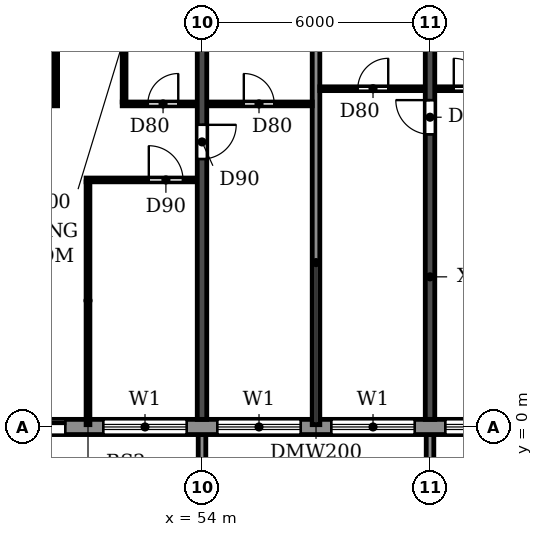
"""IFC4 building model, lengths in metres.
Left out: names, types, materials, properties, quantities, classifications, styles, units other than length and angle.
Written with IfcOpenShell. Run it as: python <this file> out.ifc"""

import sys

from ifc_helpers import new_model, si_unit, direction, frame, frame_2d, origin, place, context, subcontext, project, spatial, polyline, rectangle, outline, extrude, source, transform, mapped, element, fill, save


model = new_model("IFC4")
c1 = context("Model", 3, precision=1e-05, world=origin(), true_north=direction((0.0, 1.0)))
c2 = subcontext(c1, "Body", "Model", "MODEL_VIEW")
j1 = project(units=[si_unit("LENGTHUNIT", "METRE"), si_unit("PLANEANGLEUNIT", "RADIAN")], contexts=[c1])
p1 = place(None, origin())
s1 = spatial("IfcSite", under=j1, at=p1, CompositionType="ELEMENT")
p2 = place(p1, origin())
s2 = spatial("IfcBuilding", under=s1, at=p2, CompositionType="ELEMENT")
p3 = place(p2, frame((0.0, 0.0, 171.9)))
s3 = spatial("IfcBuildingStorey", under=s2, at=p3, CompositionType="ELEMENT", Elevation=171.9)
p4 = place(p3, frame((54.0, 0.2, 0.0), z_axis=(0.0, 0.0, 1.0), x_axis=(0.0, 1.0, 0.0)))
e1 = element("IfcWall", 1, at=p4, inside=s3, PredefinedType="SHEAR", context=c2, shape_type="SweptSolid", body=[
    extrude(rectangle(XDim=11.7, YDim=0.25, at=frame_2d((5.85, 0.0))), origin(), (0.0, 0.0, 1.0), 3.08),
])
p5 = place(p4, frame((6.85, 0.0, 0.0)))
e2 = element("IfcOpeningElement", 2, at=p5, cuts=e1, PredefinedType="OPENING", context=c2, shape_type="SweptSolid", body=[
    extrude(rectangle(XDim=0.9, YDim=2.1, at=frame_2d((0.45, 1.05))), frame((0.0, 0.135, 0.0), z_axis=(0.0, -1.0, 0.0), x_axis=(1.0, 0.0, 0.0)), (0.0, 0.0, 1.0), 0.27),
])
p6 = place(p3, frame((60.0, 0.2, 0.0), z_axis=(0.0, 0.0, 1.0), x_axis=(0.0, 1.0, 0.0)))
e3 = element("IfcWall", 3, at=p6, inside=s3, PredefinedType="SHEAR", context=c2, shape_type="SweptSolid", body=[
    extrude(rectangle(XDim=11.7, YDim=0.25, at=frame_2d((5.85, 0.0))), origin(), (0.0, 0.0, 1.0), 3.08),
])
p7 = place(p6, frame((7.5, 0.0, 0.0)))
e4 = element("IfcOpeningElement", 4, at=p7, cuts=e3, PredefinedType="OPENING", context=c2, shape_type="SweptSolid", body=[
    extrude(rectangle(XDim=0.9, YDim=2.1, at=frame_2d((0.45, 1.05))), frame((0.0, 0.135, 0.0), z_axis=(0.0, -1.0, 0.0), x_axis=(1.0, 0.0, 0.0)), (0.0, 0.0, 1.0), 0.27),
])
p8 = place(p3, frame((22.683, 0.0, 0.0), z_axis=(0.0, 0.0, 1.0), x_axis=(1.0, 0.0, 0.0)))
e5 = element("IfcWall", 5, at=p8, inside=s3, PredefinedType="STANDARD", context=c2, shape_type="SweptSolid", body=[
    extrude(rectangle(XDim=56.634, YDim=0.4, at=frame_2d((28.317, 0.0))), origin(), (0.0, 0.0, 1.0), 3.08),
])
p9 = place(p8, frame((1.717, 0.0, 0.9)))
e6 = element("IfcOpeningElement", 6, at=p9, cuts=e5, PredefinedType="OPENING", context=c2, shape_type="SweptSolid", body=[
    extrude(rectangle(XDim=2.2, YDim=1.5, at=frame_2d((1.1, 0.75))), frame((0.0, 0.21, 0.0), z_axis=(0.0, -1.0, 0.0), x_axis=(1.0, 0.0, 0.0)), (0.0, 0.0, 1.0), 0.42),
])
p10 = place(p8, frame((4.917, 0.0, 0.0)))
e7 = element("IfcOpeningElement", 7, at=p10, cuts=e5, PredefinedType="OPENING", context=c2, shape_type="SweptSolid", body=[
    extrude(rectangle(XDim=1.8, YDim=2.4, at=frame_2d((0.9, 1.2))), frame((0.0, 0.21, 0.0), z_axis=(0.0, -1.0, 0.0), x_axis=(1.0, 0.0, 0.0)), (0.0, 0.0, 1.0), 0.42),
])
p11 = place(p8, frame((7.717, 0.0, 0.9)))
e8 = element("IfcOpeningElement", 8, at=p11, cuts=e5, PredefinedType="OPENING", context=c2, shape_type="SweptSolid", body=[
    extrude(rectangle(XDim=2.2, YDim=1.5, at=frame_2d((1.1, 0.75))), frame((0.0, 0.21, 0.0), z_axis=(0.0, -1.0, 0.0), x_axis=(1.0, 0.0, 0.0)), (0.0, 0.0, 1.0), 0.42),
])
p12 = place(p8, frame((10.717, 0.0, 0.9)))
e9 = element("IfcOpeningElement", 9, at=p12, cuts=e5, PredefinedType="OPENING", context=c2, shape_type="SweptSolid", body=[
    extrude(rectangle(XDim=2.2, YDim=1.5, at=frame_2d((1.1, 0.75))), frame((0.0, 0.21, 0.0), z_axis=(0.0, -1.0, 0.0), x_axis=(1.0, 0.0, 0.0)), (0.0, 0.0, 1.0), 0.42),
])
p13 = place(p8, frame((13.717, 0.0, 0.9)))
e10 = element("IfcOpeningElement", 10, at=p13, cuts=e5, PredefinedType="OPENING", context=c2, shape_type="SweptSolid", body=[
    extrude(rectangle(XDim=2.2, YDim=1.5, at=frame_2d((1.1, 0.75))), frame((0.0, 0.21, 0.0), z_axis=(0.0, -1.0, 0.0), x_axis=(1.0, 0.0, 0.0)), (0.0, 0.0, 1.0), 0.42),
])
p14 = place(p8, frame((16.917, 0.0, 0.0)))
e11 = element("IfcOpeningElement", 11, at=p14, cuts=e5, PredefinedType="OPENING", context=c2, shape_type="SweptSolid", body=[
    extrude(rectangle(XDim=1.8, YDim=2.4, at=frame_2d((0.9, 1.2))), frame((0.0, 0.21, 0.0), z_axis=(0.0, -1.0, 0.0), x_axis=(1.0, 0.0, 0.0)), (0.0, 0.0, 1.0), 0.42),
])
p15 = place(p8, frame((19.717, 0.0, 0.9)))
e12 = element("IfcOpeningElement", 12, at=p15, cuts=e5, PredefinedType="OPENING", context=c2, shape_type="SweptSolid", body=[
    extrude(rectangle(XDim=2.2, YDim=1.5, at=frame_2d((1.1, 0.75))), frame((0.0, 0.21, 0.0), z_axis=(0.0, -1.0, 0.0), x_axis=(1.0, 0.0, 0.0)), (0.0, 0.0, 1.0), 0.42),
])
p16 = place(p8, frame((22.717, 0.0, 0.9)))
e13 = element("IfcOpeningElement", 13, at=p16, cuts=e5, PredefinedType="OPENING", context=c2, shape_type="SweptSolid", body=[
    extrude(rectangle(XDim=2.2, YDim=1.5, at=frame_2d((1.1, 0.75))), frame((0.0, 0.21, 0.0), z_axis=(0.0, -1.0, 0.0), x_axis=(1.0, 0.0, 0.0)), (0.0, 0.0, 1.0), 0.42),
])
p17 = place(p8, frame((25.917, 0.0, 0.0)))
e14 = element("IfcOpeningElement", 14, at=p17, cuts=e5, PredefinedType="OPENING", context=c2, shape_type="SweptSolid", body=[
    extrude(rectangle(XDim=1.8, YDim=2.4, at=frame_2d((0.9, 1.2))), frame((0.0, 0.21, 0.0), z_axis=(0.0, -1.0, 0.0), x_axis=(1.0, 0.0, 0.0)), (0.0, 0.0, 1.0), 0.42),
])
p18 = place(p8, frame((28.717, 0.0, 0.9)))
e15 = element("IfcOpeningElement", 15, at=p18, cuts=e5, PredefinedType="OPENING", context=c2, shape_type="SweptSolid", body=[
    extrude(rectangle(XDim=2.2, YDim=1.5, at=frame_2d((1.1, 0.75))), frame((0.0, 0.21, 0.0), z_axis=(0.0, -1.0, 0.0), x_axis=(1.0, 0.0, 0.0)), (0.0, 0.0, 1.0), 0.42),
])
p19 = place(p8, frame((31.717, 0.0, 0.9)))
e16 = element("IfcOpeningElement", 16, at=p19, cuts=e5, PredefinedType="OPENING", context=c2, shape_type="SweptSolid", body=[
    extrude(rectangle(XDim=2.2, YDim=1.5, at=frame_2d((1.1, 0.75))), frame((0.0, 0.21, 0.0), z_axis=(0.0, -1.0, 0.0), x_axis=(1.0, 0.0, 0.0)), (0.0, 0.0, 1.0), 0.42),
])
p20 = place(p8, frame((34.717, 0.0, 0.9)))
e17 = element("IfcOpeningElement", 17, at=p20, cuts=e5, PredefinedType="OPENING", context=c2, shape_type="SweptSolid", body=[
    extrude(rectangle(XDim=2.2, YDim=1.5, at=frame_2d((1.1, 0.75))), frame((0.0, 0.21, 0.0), z_axis=(0.0, -1.0, 0.0), x_axis=(1.0, 0.0, 0.0)), (0.0, 0.0, 1.0), 0.42),
])
p21 = place(p8, frame((37.717, 0.0, 0.9)))
e18 = element("IfcOpeningElement", 18, at=p21, cuts=e5, PredefinedType="OPENING", context=c2, shape_type="SweptSolid", body=[
    extrude(rectangle(XDim=2.2, YDim=1.5, at=frame_2d((1.1, 0.75))), frame((0.0, 0.21, 0.0), z_axis=(0.0, -1.0, 0.0), x_axis=(1.0, 0.0, 0.0)), (0.0, 0.0, 1.0), 0.42),
])
p22 = place(p8, frame((40.917, 0.0, 0.0)))
e19 = element("IfcOpeningElement", 19, at=p22, cuts=e5, PredefinedType="OPENING", context=c2, shape_type="SweptSolid", body=[
    extrude(rectangle(XDim=1.8, YDim=2.4, at=frame_2d((0.9, 1.2))), frame((0.0, 0.21, 0.0), z_axis=(0.0, -1.0, 0.0), x_axis=(1.0, 0.0, 0.0)), (0.0, 0.0, 1.0), 0.42),
])
p23 = place(p8, frame((43.717, 0.0, 0.9)))
e20 = element("IfcOpeningElement", 20, at=p23, cuts=e5, PredefinedType="OPENING", context=c2, shape_type="SweptSolid", body=[
    extrude(rectangle(XDim=2.2, YDim=1.5, at=frame_2d((1.1, 0.75))), frame((0.0, 0.21, 0.0), z_axis=(0.0, -1.0, 0.0), x_axis=(1.0, 0.0, 0.0)), (0.0, 0.0, 1.0), 0.42),
])
p24 = place(p8, frame((46.717, 0.0, 0.9)))
e21 = element("IfcOpeningElement", 21, at=p24, cuts=e5, PredefinedType="OPENING", context=c2, shape_type="SweptSolid", body=[
    extrude(rectangle(XDim=2.2, YDim=1.5, at=frame_2d((1.1, 0.75))), frame((0.0, 0.21, 0.0), z_axis=(0.0, -1.0, 0.0), x_axis=(1.0, 0.0, 0.0)), (0.0, 0.0, 1.0), 0.42),
])
p25 = place(p8, frame((49.717, 0.0, 0.9)))
e22 = element("IfcOpeningElement", 22, at=p25, cuts=e5, PredefinedType="OPENING", context=c2, shape_type="SweptSolid", body=[
    extrude(rectangle(XDim=2.2, YDim=1.5, at=frame_2d((1.1, 0.75))), frame((0.0, 0.21, 0.0), z_axis=(0.0, -1.0, 0.0), x_axis=(1.0, 0.0, 0.0)), (0.0, 0.0, 1.0), 0.42),
])
p26 = place(p8, frame((52.917, 0.0, 0.0)))
e23 = element("IfcOpeningElement", 23, at=p26, cuts=e5, PredefinedType="OPENING", context=c2, shape_type="SweptSolid", body=[
    extrude(rectangle(XDim=1.8, YDim=2.4, at=frame_2d((0.9, 1.2))), frame((0.0, 0.21, 0.0), z_axis=(0.0, -1.0, 0.0), x_axis=(1.0, 0.0, 0.0)), (0.0, 0.0, 1.0), 0.42),
])
m1 = source(origin(), c2, "Body", "SweptSolid", [
    extrude(outline(polyline([(0.0, 0.0), (0.2, 0.0), (0.2, 1.65), (0.0, 1.65), (0.0, 0.0)])), origin(), (0.0, 0.0, 1.0), 3.1),
])
for number, where in (
    (24, (53.9, -1.85, 0.0)),
    (25, (59.9, -1.85, 0.0)),
):
    element("IfcWall", number, at=place(p3, frame(where)), inside=s3, PredefinedType="STANDARD", context=c2, shape_type="MappedRepresentation", body=[
        mapped(m1, transform((0.0, 0.0, 0.0))),
    ])
p27 = place(p3, frame((57.0, 0.06, 0.0), z_axis=(0.0, 0.0, 1.0), x_axis=(0.0, 1.0, 0.0)))
e26 = element("IfcWall", 26, at=p27, inside=s3, PredefinedType="PARTITIONING", context=c2, shape_type="SweptSolid", body=[
    extrude(rectangle(XDim=11.83, YDim=0.2, at=frame_2d((5.915, 0.0))), origin(), (0.0, 0.0, 1.0), 3.08),
])
p28 = place(p3, frame((50.95, 6.5, 0.0), z_axis=(0.0, 0.0, 1.0), x_axis=(1.0, 0.0, 0.0)))
e27 = element("IfcWall", 27, at=p28, inside=s3, PredefinedType="PARTITIONING", context=c2, shape_type="SweptSolid", body=[
    extrude(rectangle(XDim=2.915, YDim=0.1, at=frame_2d((1.458, 0.0))), origin(), (0.0, 0.0, 1.0), 3.08),
])
p29 = place(p28, frame((1.65, 0.0, 0.0)))
e28 = element("IfcOpeningElement", 28, at=p29, cuts=e27, PredefinedType="OPENING", context=c2, shape_type="SweptSolid", body=[
    extrude(rectangle(XDim=0.9, YDim=2.1, at=frame_2d((0.45, 1.05))), frame((0.0, 0.06, 0.0), z_axis=(0.0, -1.0, 0.0), x_axis=(1.0, 0.0, 0.0)), (0.0, 0.0, 1.0), 0.12),
])
p30 = place(p3, frame((48.135, 8.5, 0.0), z_axis=(0.0, 0.0, 1.0), x_axis=(1.0, 0.0, 0.0)))
e29 = element("IfcWall", 29, at=p30, inside=s3, PredefinedType="PARTITIONING", context=c2, shape_type="SweptSolid", body=[
    extrude(rectangle(XDim=2.065, YDim=0.1, at=frame_2d((1.032, 0.0))), origin(), (0.0, 0.0, 1.0), 3.08),
])
p31 = place(p30, frame((0.49, 0.0, 0.0)))
e30 = element("IfcOpeningElement", 30, at=p31, cuts=e29, PredefinedType="OPENING", context=c2, shape_type="SweptSolid", body=[
    extrude(rectangle(XDim=0.9, YDim=2.1, at=frame_2d((0.45, 1.05))), frame((0.0, 0.06, 0.0), z_axis=(0.0, -1.0, 0.0), x_axis=(1.0, 0.0, 0.0)), (0.0, 0.0, 1.0), 0.12),
])
p32 = place(p3, frame((51.9, 8.5, 0.0), z_axis=(0.0, 0.0, 1.0), x_axis=(1.0, 0.0, 0.0)))
e31 = element("IfcWall", 31, at=p32, inside=s3, PredefinedType="PARTITIONING", context=c2, shape_type="SweptSolid", body=[
    extrude(rectangle(XDim=1.965, YDim=0.1, at=frame_2d((0.982, 0.0))), origin(), (0.0, 0.0, 1.0), 3.08),
])
p33 = place(p32, frame((0.675, 0.0, 0.0)))
e32 = element("IfcOpeningElement", 32, at=p33, cuts=e31, PredefinedType="OPENING", context=c2, shape_type="SweptSolid", body=[
    extrude(rectangle(XDim=0.8, YDim=2.1, at=frame_2d((0.4, 1.05))), frame((0.0, 0.06, 0.0), z_axis=(0.0, -1.0, 0.0), x_axis=(1.0, 0.0, 0.0)), (0.0, 0.0, 1.0), 0.12),
])
p34 = place(p3, frame((54.135, 8.5, 0.0), z_axis=(0.0, 0.0, 1.0), x_axis=(1.0, 0.0, 0.0)))
e33 = element("IfcWall", 33, at=p34, inside=s3, PredefinedType="PARTITIONING", context=c2, shape_type="SweptSolid", body=[
    extrude(rectangle(XDim=2.765, YDim=0.1, at=frame_2d((1.382, 0.0))), origin(), (0.0, 0.0, 1.0), 3.08),
])
p35 = place(p34, frame((0.965, 0.0, 0.0)))
e34 = element("IfcOpeningElement", 34, at=p35, cuts=e33, PredefinedType="OPENING", context=c2, shape_type="SweptSolid", body=[
    extrude(rectangle(XDim=0.8, YDim=2.1, at=frame_2d((0.4, 1.05))), frame((0.0, 0.06, 0.0), z_axis=(0.0, -1.0, 0.0), x_axis=(1.0, 0.0, 0.0)), (0.0, 0.0, 1.0), 0.12),
])
p36 = place(p3, frame((57.1, 8.9, 0.0), z_axis=(0.0, 0.0, 1.0), x_axis=(1.0, 0.0, 0.0)))
e35 = element("IfcWall", 35, at=p36, inside=s3, PredefinedType="PARTITIONING", context=c2, shape_type="SweptSolid", body=[
    extrude(rectangle(XDim=2.765, YDim=0.1, at=frame_2d((1.382, 0.0))), origin(), (0.0, 0.0, 1.0), 3.08),
])
p37 = place(p36, frame((1.0, 0.0, 0.0)))
e36 = element("IfcOpeningElement", 36, at=p37, cuts=e35, PredefinedType="OPENING", context=c2, shape_type="SweptSolid", body=[
    extrude(rectangle(XDim=0.8, YDim=2.1, at=frame_2d((0.4, 1.05))), frame((0.0, 0.06, 0.0), z_axis=(0.0, -1.0, 0.0), x_axis=(1.0, 0.0, 0.0)), (0.0, 0.0, 1.0), 0.12),
])
p38 = place(p3, frame((60.135, 8.9, 0.0), z_axis=(0.0, 0.0, 1.0), x_axis=(1.0, 0.0, 0.0)))
e37 = element("IfcWall", 37, at=p38, inside=s3, PredefinedType="PARTITIONING", context=c2, shape_type="SweptSolid", body=[
    extrude(rectangle(XDim=1.965, YDim=0.1, at=frame_2d((0.982, 0.0))), origin(), (0.0, 0.0, 1.0), 3.08),
])
p39 = place(p38, frame((0.49, 0.0, 0.0)))
e38 = element("IfcOpeningElement", 38, at=p39, cuts=e37, PredefinedType="OPENING", context=c2, shape_type="SweptSolid", body=[
    extrude(rectangle(XDim=0.8, YDim=2.1, at=frame_2d((0.4, 1.05))), frame((0.0, 0.06, 0.0), z_axis=(0.0, -1.0, 0.0), x_axis=(1.0, 0.0, 0.0)), (0.0, 0.0, 1.0), 0.12),
])
p40 = place(p3, frame((50.15, 8.55, 0.0), z_axis=(0.0, 0.0, 1.0), x_axis=(0.0, 1.0, 0.0)))
e39 = element("IfcWall", 39, at=p40, inside=s3, PredefinedType="PARTITIONING", context=c2, shape_type="SweptSolid", body=[
    extrude(rectangle(XDim=3.34, YDim=0.1, at=frame_2d((1.67, 0.0))), origin(), (0.0, 0.0, 1.0), 3.08),
])
p41 = place(p3, frame((51.0, 0.06, 0.0), z_axis=(0.0, 0.0, 1.0), x_axis=(0.0, 1.0, 0.0)))
e40 = element("IfcWall", 40, at=p41, inside=s3, PredefinedType="PARTITIONING", context=c2, shape_type="SweptSolid", body=[
    extrude(rectangle(XDim=6.39, YDim=0.1, at=frame_2d((3.195, 0.0))), origin(), (0.0, 0.0, 1.0), 3.08),
])
p42 = place(p3, frame((51.95, 8.55, 0.0), z_axis=(0.0, 0.0, 1.0), x_axis=(0.0, 1.0, 0.0)))
e41 = element("IfcWall", 41, at=p42, inside=s3, PredefinedType="PARTITIONING", context=c2, shape_type="SweptSolid", body=[
    extrude(rectangle(XDim=3.34, YDim=0.1, at=frame_2d((1.67, 0.0))), origin(), (0.0, 0.0, 1.0), 3.08),
])
p43 = place(p17, origin())
e42 = element("IfcDoor", 42, at=p43, inside=s3, OperationType="DOUBLE_DOOR_SLIDING", PredefinedType="DOOR", context=c2, shape_type="SweptSolid", body=[
    extrude(rectangle(XDim=1.8, YDim=2.4, at=frame_2d((0.9, 1.2))), frame((0.0, 0.025, 0.0), z_axis=(0.0, -1.0, 0.0), x_axis=(1.0, 0.0, 0.0)), (0.0, 0.0, 1.0), 0.05),
])
fill(e14, e42)
p44 = place(p18, origin())
e43 = element("IfcWindow", 43, at=p44, inside=s3, PartitioningType="DOUBLE_PANEL_HORIZONTAL", PredefinedType="WINDOW", context=c2, shape_type="SweptSolid", body=[
    extrude(rectangle(XDim=2.2, YDim=1.5, at=frame_2d((1.1, 0.75))), frame((0.0, 0.03, 0.0), z_axis=(0.0, -1.0, 0.0), x_axis=(1.0, 0.0, 0.0)), (0.0, 0.0, 1.0), 0.06),
])
fill(e15, e43)
p45 = place(p19, origin())
e44 = element("IfcWindow", 44, at=p45, inside=s3, PartitioningType="DOUBLE_PANEL_HORIZONTAL", PredefinedType="WINDOW", context=c2, shape_type="SweptSolid", body=[
    extrude(rectangle(XDim=2.2, YDim=1.5, at=frame_2d((1.1, 0.75))), frame((0.0, 0.03, 0.0), z_axis=(0.0, -1.0, 0.0), x_axis=(1.0, 0.0, 0.0)), (0.0, 0.0, 1.0), 0.06),
])
fill(e16, e44)
p46 = place(p20, origin())
e45 = element("IfcWindow", 45, at=p46, inside=s3, PartitioningType="DOUBLE_PANEL_HORIZONTAL", PredefinedType="WINDOW", context=c2, shape_type="SweptSolid", body=[
    extrude(rectangle(XDim=2.2, YDim=1.5, at=frame_2d((1.1, 0.75))), frame((0.0, 0.03, 0.0), z_axis=(0.0, -1.0, 0.0), x_axis=(1.0, 0.0, 0.0)), (0.0, 0.0, 1.0), 0.06),
])
fill(e17, e45)
p47 = place(p21, origin())
e46 = element("IfcWindow", 46, at=p47, inside=s3, PartitioningType="DOUBLE_PANEL_HORIZONTAL", PredefinedType="WINDOW", context=c2, shape_type="SweptSolid", body=[
    extrude(rectangle(XDim=2.2, YDim=1.5, at=frame_2d((1.1, 0.75))), frame((0.0, 0.03, 0.0), z_axis=(0.0, -1.0, 0.0), x_axis=(1.0, 0.0, 0.0)), (0.0, 0.0, 1.0), 0.06),
])
fill(e18, e46)
p48 = place(p35, origin())
e47 = element("IfcDoor", 47, at=p48, inside=s3, OperationType="SINGLE_SWING_LEFT", PredefinedType="DOOR", context=c2, shape_type="SweptSolid", body=[
    extrude(rectangle(XDim=0.8, YDim=2.1, at=frame_2d((0.4, 1.05))), frame((0.0, 0.025, 0.0), z_axis=(0.0, -1.0, 0.0), x_axis=(1.0, 0.0, 0.0)), (0.0, 0.0, 1.0), 0.05),
])
fill(e34, e47)
p49 = place(p33, origin())
e48 = element("IfcDoor", 48, at=p49, inside=s3, OperationType="SINGLE_SWING_RIGHT", PredefinedType="DOOR", context=c2, shape_type="SweptSolid", body=[
    extrude(rectangle(XDim=0.8, YDim=2.1, at=frame_2d((0.4, 1.05))), frame((0.0, 0.025, 0.0), z_axis=(0.0, -1.0, 0.0), x_axis=(1.0, 0.0, 0.0)), (0.0, 0.0, 1.0), 0.05),
])
fill(e32, e48)
p50 = place(p29, origin())
e49 = element("IfcDoor", 49, at=p50, inside=s3, OperationType="SINGLE_SWING_LEFT", PredefinedType="DOOR", context=c2, shape_type="SweptSolid", body=[
    extrude(rectangle(XDim=0.9, YDim=2.1, at=frame_2d((0.45, 1.05))), frame((0.0, 0.025, 0.0), z_axis=(0.0, -1.0, 0.0), x_axis=(1.0, 0.0, 0.0)), (0.0, 0.0, 1.0), 0.05),
])
fill(e28, e49)
p51 = place(p5, frame((0.9, 0.0, 0.0), z_axis=(0.0, 0.0, 1.0), x_axis=(-1.0, 0.0, 0.0)))
e50 = element("IfcDoor", 50, at=p51, inside=s3, OperationType="SINGLE_SWING_LEFT", PredefinedType="DOOR", context=c2, shape_type="SweptSolid", body=[
    extrude(rectangle(XDim=0.9, YDim=2.1, at=frame_2d((0.45, 1.05))), frame((0.0, 0.025, 0.0), z_axis=(0.0, -1.0, 0.0), x_axis=(1.0, 0.0, 0.0)), (0.0, 0.0, 1.0), 0.05),
])
fill(e2, e50)
p52 = place(p37, origin())
e51 = element("IfcDoor", 51, at=p52, inside=s3, OperationType="SINGLE_SWING_RIGHT", PredefinedType="DOOR", context=c2, shape_type="SweptSolid", body=[
    extrude(rectangle(XDim=0.8, YDim=2.1, at=frame_2d((0.4, 1.05))), frame((0.0, 0.025, 0.0), z_axis=(0.0, -1.0, 0.0), x_axis=(1.0, 0.0, 0.0)), (0.0, 0.0, 1.0), 0.05),
])
fill(e36, e51)
p53 = place(p7, origin())
e52 = element("IfcDoor", 52, at=p53, inside=s3, OperationType="SINGLE_SWING_RIGHT", PredefinedType="DOOR", context=c2, shape_type="SweptSolid", body=[
    extrude(rectangle(XDim=0.9, YDim=2.1, at=frame_2d((0.45, 1.05))), frame((0.0, 0.025, 0.0), z_axis=(0.0, -1.0, 0.0), x_axis=(1.0, 0.0, 0.0)), (0.0, 0.0, 1.0), 0.05),
])
fill(e4, e52)
p54 = place(p39, origin())
e53 = element("IfcDoor", 53, at=p54, inside=s3, OperationType="SINGLE_SWING_LEFT", PredefinedType="DOOR", context=c2, shape_type="SweptSolid", body=[
    extrude(rectangle(XDim=0.8, YDim=2.1, at=frame_2d((0.4, 1.05))), frame((0.0, 0.025, 0.0), z_axis=(0.0, -1.0, 0.0), x_axis=(1.0, 0.0, 0.0)), (0.0, 0.0, 1.0), 0.05),
])
fill(e38, e53)
save(model, sys.argv[1])
